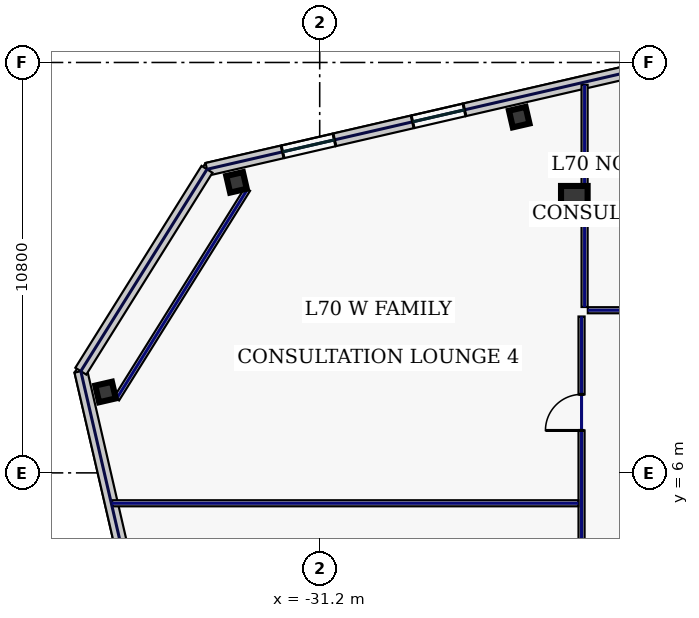
"""IFC4 building model, lengths in metres.
Left out: names, types, materials, properties, quantities, classifications, styles, units other than length and angle.
Written with IfcOpenShell. Run it as: python <this file> out.ifc"""

import sys

from ifc_helpers import new_model, si_unit, direction, frame, frame_2d, origin, origin_2d, place, context, subcontext, project, spatial, rectangle, hollow_rectangle, extrude, element, fill, save


model = new_model("IFC4")
c1 = context("Model", 3, precision=1e-05, world=origin(), true_north=direction((0.0, 1.0)))
c2 = subcontext(c1, "Body", "Model", "MODEL_VIEW")
j1 = project(units=[si_unit("LENGTHUNIT", "METRE"), si_unit("PLANEANGLEUNIT", "RADIAN")], contexts=[c1])
p1 = place(None, origin())
s1 = spatial("IfcSite", under=j1, at=p1, CompositionType="ELEMENT")
p2 = place(p1, origin())
s2 = spatial("IfcBuilding", under=s1, at=p2, CompositionType="ELEMENT")
p3 = place(p2, frame((0.0, 0.0, 301.0)))
s3 = spatial("IfcBuildingStorey", under=s2, at=p3, CompositionType="ELEMENT", Elevation=301.0)
p4 = place(p3, frame((-24.5, 13.2, 0.0), z_axis=(0.0, 0.0, 1.0), x_axis=(1.0, 0.0, 0.0)))
e1 = element("IfcColumn", 1, at=p4, inside=s3, PredefinedType="COLUMN", context=c2, shape_type="SweptSolid", body=[
    extrude(hollow_rectangle(XDim=0.7, YDim=0.7, WallThickness=0.032, at=origin_2d()), origin(), (0.0, 0.0, 1.0), 3.74),
])
for number, where, z_axis, x_axis in (
    (2, (-25.95, 15.362, 0.0), (0.0, 0.0, 1.0), (0.974, 0.225, 0.0)),
    (3, (-33.389, 13.645, 0.0), (0.0, 0.0, 1.0), (0.974, 0.225, 0.0)),
    (4, (-36.836, 8.128, 0.0), (0.0, 0.0, 1.0), (0.974, 0.225, 0.0)),
):
    element("IfcColumn", number, at=place(p3, frame(where, z_axis=z_axis, x_axis=x_axis)), inside=s3, PredefinedType="COLUMN", context=c2, shape_type="SweptSolid", body=[
        extrude(hollow_rectangle(XDim=0.45, YDim=0.45, WallThickness=0.022, at=origin_2d()), origin(), (0.0, 0.0, 1.0), 3.74),
    ])
p5 = place(p3, frame((-17.245, 17.895, 0.0), z_axis=(0.0, 0.0, 1.0), x_axis=(-0.97437318493, -0.224937539085, 0.0)))
e5 = element("IfcWall", 5, at=p5, inside=s3, PredefinedType="STANDARD", context=c2, shape_type="SweptSolid", body=[
    extrude(rectangle(XDim=17.366, YDim=0.34, at=frame_2d((8.683, 0.0))), origin(), (0.0, 0.0, 1.0), 3.74),
])
p6 = place(p5, frame((13.925, 0.0, 1.0)))
e6 = element("IfcOpeningElement", 6, at=p6, cuts=e5, PredefinedType="OPENING", context=c2, shape_type="SweptSolid", body=[
    extrude(rectangle(XDim=1.4, YDim=1.85, at=frame_2d((0.7, 0.925))), frame((0.0, 0.18, 0.0), z_axis=(0.0, -1.0, 0.0), x_axis=(1.0, 0.0, 0.0)), (0.0, 0.0, 1.0), 0.36),
])
p7 = place(p5, frame((10.413, 0.0, 1.0)))
e7 = element("IfcOpeningElement", 7, at=p7, cuts=e5, PredefinedType="OPENING", context=c2, shape_type="SweptSolid", body=[
    extrude(rectangle(XDim=1.4, YDim=1.85, at=frame_2d((0.7, 0.925))), frame((0.0, 0.18, 0.0), z_axis=(0.0, -1.0, 0.0), x_axis=(1.0, 0.0, 0.0)), (0.0, 0.0, 1.0), 0.36),
])
p8 = place(p5, frame((3.329, 0.0, 1.0)))
e8 = element("IfcOpeningElement", 8, at=p8, cuts=e5, PredefinedType="OPENING", context=c2, shape_type="SweptSolid", body=[
    extrude(rectangle(XDim=0.85, YDim=1.85, at=frame_2d((0.425, 0.925))), frame((0.0, 0.18, 0.0), z_axis=(0.0, -1.0, 0.0), x_axis=(1.0, 0.0, 0.0)), (0.0, 0.0, 1.0), 0.36),
])
p9 = place(p3, frame((-37.486, 8.676, 0.0), z_axis=(0.0, 0.0, 1.0), x_axis=(0.224953091034, -0.974369594576, 0.0)))
e9 = element("IfcWall", 9, at=p9, inside=s3, PredefinedType="STANDARD", context=c2, shape_type="SweptSolid", body=[
    extrude(rectangle(XDim=36.2, YDim=0.34, at=frame_2d((18.1, 0.0))), origin(), (0.0, 0.0, 1.0), 3.74),
])
p10 = place(p9, frame((4.825, 0.0, 0.75)))
e10 = element("IfcOpeningElement", 10, at=p10, cuts=e9, PredefinedType="OPENING", context=c2, shape_type="SweptSolid", body=[
    extrude(rectangle(XDim=0.85, YDim=1.85, at=frame_2d((0.425, 0.925))), frame((0.0, 0.18, 0.0), z_axis=(0.0, -1.0, 0.0), x_axis=(1.0, 0.0, 0.0)), (0.0, 0.0, 1.0), 0.36),
])
p11 = place(p9, frame((12.425, 0.0, 0.75)))
e11 = element("IfcOpeningElement", 11, at=p11, cuts=e9, PredefinedType="OPENING", context=c2, shape_type="SweptSolid", body=[
    extrude(rectangle(XDim=0.85, YDim=1.85, at=frame_2d((0.425, 0.925))), frame((0.0, 0.18, 0.0), z_axis=(0.0, -1.0, 0.0), x_axis=(1.0, 0.0, 0.0)), (0.0, 0.0, 1.0), 0.36),
])
p12 = place(p9, frame((21.825, 0.0, 0.58)))
e12 = element("IfcOpeningElement", 12, at=p12, cuts=e9, PredefinedType="OPENING", context=c2, shape_type="SweptSolid", body=[
    extrude(rectangle(XDim=1.6, YDim=2.3, at=frame_2d((0.8, 1.15))), frame((0.0, 0.18, 0.0), z_axis=(0.0, -1.0, 0.0), x_axis=(1.0, 0.0, 0.0)), (0.0, 0.0, 1.0), 0.36),
])
p13 = place(p9, frame((30.875, 0.0, 0.58)))
e13 = element("IfcOpeningElement", 13, at=p13, cuts=e9, PredefinedType="OPENING", context=c2, shape_type="SweptSolid", body=[
    extrude(rectangle(XDim=1.6, YDim=2.3, at=frame_2d((0.8, 1.15))), frame((0.0, 0.18, 0.0), z_axis=(0.0, -1.0, 0.0), x_axis=(1.0, 0.0, 0.0)), (0.0, 0.0, 1.0), 0.36),
])
p14 = place(p3, frame((-34.166, 13.989, 0.0), z_axis=(0.0, 0.0, 1.0), x_axis=(-0.529935887993, -0.848037708252, 0.0)))
e14 = element("IfcWall", 14, at=p14, inside=s3, PredefinedType="STANDARD", context=c2, shape_type="SweptSolid", body=[
    extrude(rectangle(XDim=6.265, YDim=0.34, at=frame_2d((3.133, 0.0))), origin(), (0.0, 0.0, 1.0), 3.74),
])
p15 = place(p3, frame((-33.1, 13.465, 0.0), z_axis=(0.0, 0.0, 1.0), x_axis=(-0.529958457806, -0.848023604035, 0.0)))
e15 = element("IfcWall", 15, at=p15, inside=s3, PredefinedType="PARTITIONING", context=c2, shape_type="SweptSolid", body=[
    extrude(rectangle(XDim=6.505, YDim=0.16, at=frame_2d((3.252, 0.0))), origin(), (0.0, 0.0, 1.0), 3.74),
])
p16 = place(p3, frame((-24.31, -10.015, 0.0), z_axis=(0.0, 0.0, 1.0), x_axis=(0.0, 1.0, 0.0)))
e16 = element("IfcWall", 16, at=p16, inside=s3, PredefinedType="PARTITIONING", context=c2, shape_type="SweptSolid", body=[
    extrude(rectangle(XDim=20.13, YDim=0.16, at=frame_2d((10.065, 0.0))), origin(), (0.0, 0.0, 1.0), 3.74),
])
p17 = place(p16, frame((2.169, 0.0, 0.0)))
e17 = element("IfcOpeningElement", 17, at=p17, cuts=e16, PredefinedType="OPENING", context=c2, shape_type="SweptSolid", body=[
    extrude(rectangle(XDim=0.95, YDim=2.2, at=frame_2d((0.475, 1.1))), frame((0.0, 0.09, 0.0), z_axis=(0.0, -1.0, 0.0), x_axis=(1.0, 0.0, 0.0)), (0.0, 0.0, 1.0), 0.18),
])
p18 = place(p16, frame((6.4, 0.0, 0.0)))
e18 = element("IfcOpeningElement", 18, at=p18, cuts=e16, PredefinedType="OPENING", context=c2, shape_type="SweptSolid", body=[
    extrude(rectangle(XDim=0.95, YDim=2.2, at=frame_2d((0.475, 1.1))), frame((0.0, 0.09, 0.0), z_axis=(0.0, -1.0, 0.0), x_axis=(1.0, 0.0, 0.0)), (0.0, 0.0, 1.0), 0.18),
])
p19 = place(p16, frame((11.6, 0.0, 0.0)))
e19 = element("IfcOpeningElement", 19, at=p19, cuts=e16, PredefinedType="OPENING", context=c2, shape_type="SweptSolid", body=[
    extrude(rectangle(XDim=0.95, YDim=2.2, at=frame_2d((0.475, 1.1))), frame((0.0, 0.09, 0.0), z_axis=(0.0, -1.0, 0.0), x_axis=(1.0, 0.0, 0.0)), (0.0, 0.0, 1.0), 0.18),
])
p20 = place(p16, frame((17.131, 0.0, 0.0)))
e20 = element("IfcOpeningElement", 20, at=p20, cuts=e16, PredefinedType="OPENING", context=c2, shape_type="SweptSolid", body=[
    extrude(rectangle(XDim=0.95, YDim=2.2, at=frame_2d((0.475, 1.1))), frame((0.0, 0.09, 0.0), z_axis=(0.0, -1.0, 0.0), x_axis=(1.0, 0.0, 0.0)), (0.0, 0.0, 1.0), 0.18),
])
p21 = place(p3, frame((-24.145, 10.28, 0.0), z_axis=(0.0, 0.0, 1.0), x_axis=(1.0, 0.0, 0.0)))
e21 = element("IfcWall", 21, at=p21, inside=s3, PredefinedType="PARTITIONING", context=c2, shape_type="SweptSolid", body=[
    extrude(rectangle(XDim=48.29, YDim=0.16, at=frame_2d((24.145, 0.0))), origin(), (0.0, 0.0, 1.0), 3.74),
])
p22 = place(p21, frame((2.044, 0.0, 0.0)))
e22 = element("IfcOpeningElement", 22, at=p22, cuts=e21, PredefinedType="OPENING", context=c2, shape_type="SweptSolid", body=[
    extrude(rectangle(XDim=0.95, YDim=2.2, at=frame_2d((0.475, 1.1))), frame((0.0, 0.09, 0.0), z_axis=(0.0, -1.0, 0.0), x_axis=(1.0, 0.0, 0.0)), (0.0, 0.0, 1.0), 0.18),
])
p23 = place(p21, frame((6.885, 0.0, 0.0)))
e23 = element("IfcOpeningElement", 23, at=p23, cuts=e21, PredefinedType="OPENING", context=c2, shape_type="SweptSolid", body=[
    extrude(rectangle(XDim=0.95, YDim=2.2, at=frame_2d((0.475, 1.1))), frame((0.0, 0.09, 0.0), z_axis=(0.0, -1.0, 0.0), x_axis=(1.0, 0.0, 0.0)), (0.0, 0.0, 1.0), 0.18),
])
p24 = place(p21, frame((14.8, 0.0, 0.0)))
e24 = element("IfcOpeningElement", 24, at=p24, cuts=e21, PredefinedType="OPENING", context=c2, shape_type="SweptSolid", body=[
    extrude(rectangle(XDim=1.3, YDim=2.2, at=frame_2d((0.65, 1.1))), frame((0.0, 0.09, 0.0), z_axis=(0.0, -1.0, 0.0), x_axis=(1.0, 0.0, 0.0)), (0.0, 0.0, 1.0), 0.18),
])
p25 = place(p21, frame((25.58, 0.0, 0.0)))
e25 = element("IfcOpeningElement", 25, at=p25, cuts=e21, PredefinedType="OPENING", context=c2, shape_type="SweptSolid", body=[
    extrude(rectangle(XDim=1.3, YDim=2.2, at=frame_2d((0.65, 1.1))), frame((0.0, 0.09, 0.0), z_axis=(0.0, -1.0, 0.0), x_axis=(1.0, 0.0, 0.0)), (0.0, 0.0, 1.0), 0.18),
])
p26 = place(p21, frame((36.355, 0.0, 0.0)))
e26 = element("IfcOpeningElement", 26, at=p26, cuts=e21, PredefinedType="OPENING", context=c2, shape_type="SweptSolid", body=[
    extrude(rectangle(XDim=0.95, YDim=2.2, at=frame_2d((0.475, 1.1))), frame((0.0, 0.09, 0.0), z_axis=(0.0, -1.0, 0.0), x_axis=(1.0, 0.0, 0.0)), (0.0, 0.0, 1.0), 0.18),
])
p27 = place(p21, frame((44.401, 0.0, 0.0)))
e27 = element("IfcOpeningElement", 27, at=p27, cuts=e21, PredefinedType="OPENING", context=c2, shape_type="SweptSolid", body=[
    extrude(rectangle(XDim=1.3, YDim=2.2, at=frame_2d((0.65, 1.1))), frame((0.0, 0.09, 0.0), z_axis=(0.0, -1.0, 0.0), x_axis=(1.0, 0.0, 0.0)), (0.0, 0.0, 1.0), 0.18),
])
p28 = place(p3, frame((-24.23, 10.365, 0.0), z_axis=(0.0, 0.0, 1.0), x_axis=(0.0, 1.0, 0.0)))
e28 = element("IfcWall", 28, at=p28, inside=s3, PredefinedType="PARTITIONING", context=c2, shape_type="SweptSolid", body=[
    extrude(rectangle(XDim=5.846, YDim=0.16, at=frame_2d((2.923, 0.0))), origin(), (0.0, 0.0, 1.0), 3.74),
])
p29 = place(p3, frame((-36.663, 5.2, 0.0), z_axis=(0.0, 0.0, 1.0), x_axis=(1.0, 0.0, 0.0)))
e29 = element("IfcWall", 29, at=p29, inside=s3, PredefinedType="PARTITIONING", context=c2, shape_type="SweptSolid", body=[
    extrude(rectangle(XDim=12.268, YDim=0.16, at=frame_2d((6.134, 0.0))), origin(), (0.0, 0.0, 1.0), 3.74),
])
p30 = place(p6, origin())
e30 = element("IfcWindow", 30, at=p30, inside=s3, PartitioningType="SINGLE_PANEL", PredefinedType="WINDOW", context=c2, shape_type="SweptSolid", body=[
    extrude(rectangle(XDim=1.4, YDim=1.85, at=frame_2d((0.7, 0.925))), frame((0.0, 0.03, 0.0), z_axis=(0.0, -1.0, 0.0), x_axis=(1.0, 0.0, 0.0)), (0.0, 0.0, 1.0), 0.06),
])
fill(e6, e30)
p31 = place(p7, origin())
e31 = element("IfcWindow", 31, at=p31, inside=s3, PartitioningType="SINGLE_PANEL", PredefinedType="WINDOW", context=c2, shape_type="SweptSolid", body=[
    extrude(rectangle(XDim=1.4, YDim=1.85, at=frame_2d((0.7, 0.925))), frame((0.0, 0.03, 0.0), z_axis=(0.0, -1.0, 0.0), x_axis=(1.0, 0.0, 0.0)), (0.0, 0.0, 1.0), 0.06),
])
fill(e7, e31)
p32 = place(p20, origin())
e32 = element("IfcDoor", 32, at=p32, inside=s3, OperationType="SINGLE_SWING_LEFT", PredefinedType="DOOR", context=c2, shape_type="SweptSolid", body=[
    extrude(rectangle(XDim=0.95, YDim=2.2, at=frame_2d((0.475, 1.1))), frame((0.0, 0.025, 0.0), z_axis=(0.0, -1.0, 0.0), x_axis=(1.0, 0.0, 0.0)), (0.0, 0.0, 1.0), 0.05),
])
fill(e20, e32)
save(model, sys.argv[1])
